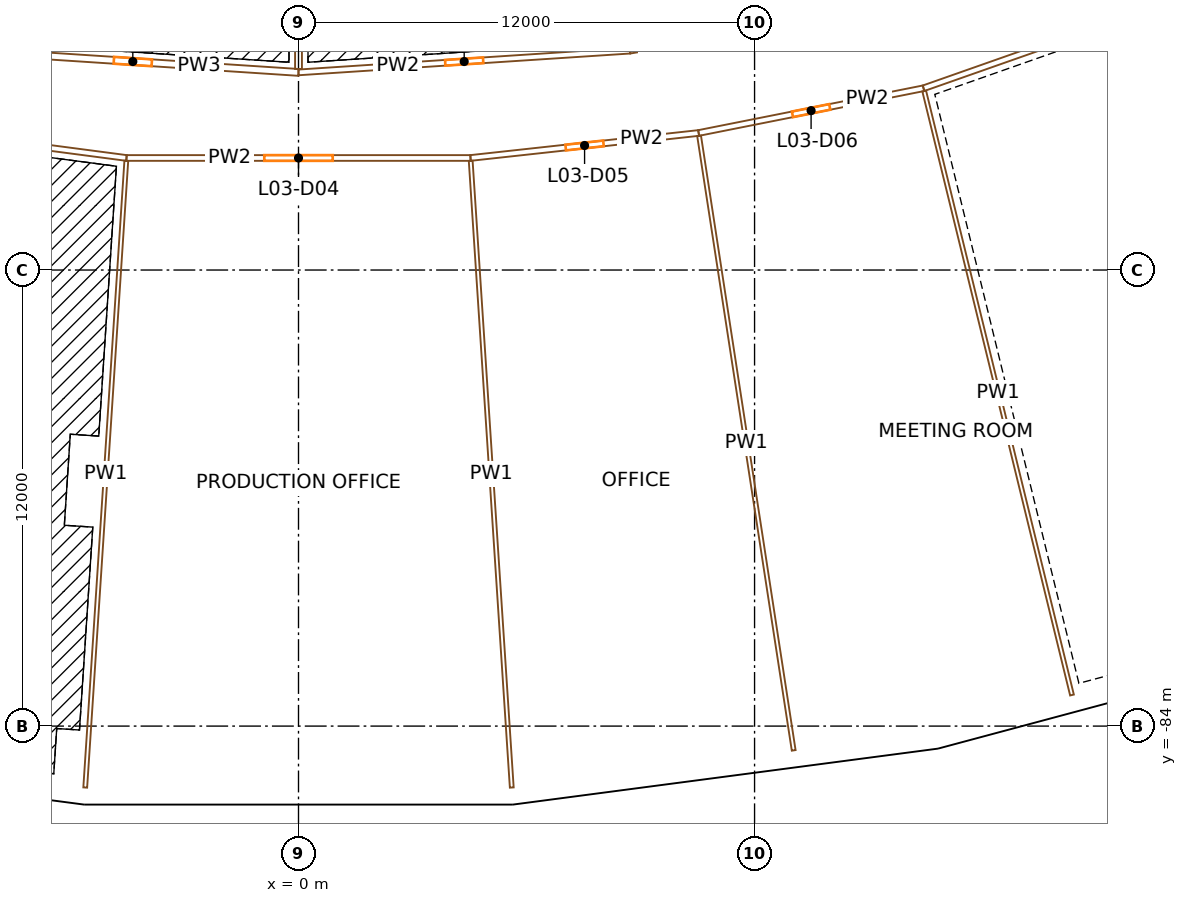
"""IFC4 building model, lengths in metres.
Left out: names, types, materials, properties, quantities, classifications, styles, units other than length and angle.
Written with IfcOpenShell. Run it as: python <this file> out.ifc"""

import sys

from ifc_helpers import new_model, si_unit, direction, frame, frame_2d, origin, origin_2d, place, context, subcontext, project, spatial, rectangle, extrude, element, fill, save


model = new_model("IFC4")
c1 = context("Model", 3, precision=1e-05, world=origin(), true_north=direction((0.0, 1.0)))
c2 = subcontext(c1, "Body", "Model", "MODEL_VIEW")
j1 = project(units=[si_unit("LENGTHUNIT", "METRE"), si_unit("PLANEANGLEUNIT", "RADIAN")], contexts=[c1])
p1 = place(None, origin())
s1 = spatial("IfcSite", under=j1, at=p1, CompositionType="ELEMENT")
p2 = place(p1, origin())
s2 = spatial("IfcBuilding", under=s1, at=p2, CompositionType="ELEMENT")
p3 = place(p2, frame((0.0, 0.0, 27.0)))
s3 = spatial("IfcBuildingStorey", under=s2, at=p3, CompositionType="ELEMENT", Elevation=27.0)
p4 = place(p3, frame((-5.085, -77.583, 0.0), z_axis=(0.0, 0.0, 1.0), x_axis=(0.997858923239, -0.06540312923, 0.0)))
e1 = element("IfcColumn", 1, at=p4, inside=s3, PredefinedType="COLUMN", context=c2, shape_type="SweptSolid", body=[
    extrude(rectangle(XDim=1.4, YDim=1.8, at=origin_2d()), origin(), (0.0, 0.0, 1.0), 4.5),
])
p5 = place(p3, frame((-5.576, -85.067, 0.0), z_axis=(0.0, 0.0, 1.0), x_axis=(0.997858923239, -0.06540312923, 0.0)))
e2 = element("IfcColumn", 2, at=p5, inside=s3, PredefinedType="COLUMN", context=c2, shape_type="SweptSolid", body=[
    extrude(rectangle(XDim=1.1, YDim=1.3, at=origin_2d()), origin(), (0.0, 0.0, 1.0), 4.5),
])
p6 = place(p3, frame((5.085, -77.583, 0.0), z_axis=(0.0, 0.0, 1.0), x_axis=(0.997858923239, 0.06540312923, 0.0)))
e3 = element("IfcColumn", 3, at=p6, inside=s3, PredefinedType="COLUMN", context=c2, shape_type="SweptSolid", body=[
    extrude(rectangle(XDim=1.4, YDim=1.8, at=origin_2d()), origin(), (0.0, 0.0, 1.0), 4.5),
])
p7 = place(p3, frame((5.576, -85.067, 0.0), z_axis=(0.0, 0.0, 1.0), x_axis=(0.997858923239, 0.06540312923, 0.0)))
e4 = element("IfcColumn", 4, at=p7, inside=s3, PredefinedType="COLUMN", context=c2, shape_type="SweptSolid", body=[
    extrude(rectangle(XDim=1.1, YDim=1.3, at=origin_2d()), origin(), (0.0, 0.0, 1.0), 4.5),
])
p8 = place(p3, frame((15.168, -76.256, 0.0), z_axis=(0.0, 0.0, 1.0), x_axis=(0.980785280403, 0.195090322016, 0.0)))
e5 = element("IfcColumn", 5, at=p8, inside=s3, PredefinedType="COLUMN", context=c2, shape_type="SweptSolid", body=[
    extrude(rectangle(XDim=1.4, YDim=1.8, at=origin_2d()), origin(), (0.0, 0.0, 1.0), 4.5),
])
p9 = place(p3, frame((16.631, -83.612, 0.0), z_axis=(0.0, 0.0, 1.0), x_axis=(0.980785280403, 0.195090322016, 0.0)))
e6 = element("IfcColumn", 6, at=p9, inside=s3, PredefinedType="COLUMN", context=c2, shape_type="SweptSolid", body=[
    extrude(rectangle(XDim=1.1, YDim=1.3, at=origin_2d()), origin(), (0.0, 0.0, 1.0), 4.5),
])
p10 = place(p3, frame((-5.656, -85.84, 0.0), z_axis=(0.0, 0.0, 1.0), x_axis=(1.0, 0.0, 0.0)))
e7 = element("IfcWall", 7, at=p10, inside=s3, PredefinedType="SOLIDWALL", context=c2, shape_type="SweptSolid", body=[
    extrude(rectangle(XDim=11.312, YDim=0.45, at=frame_2d((5.656, 0.0))), origin(), (0.0, 0.0, 1.0), 3.2),
])
p11 = place(p10, frame((4.006, 0.0, 0.9)))
e8 = element("IfcOpeningElement", 8, at=p11, cuts=e7, PredefinedType="OPENING", context=c2, shape_type="SweptSolid", body=[
    extrude(rectangle(XDim=1.2, YDim=2.15, at=frame_2d((0.6, 1.075))), frame((0.0, 0.235, 0.0), z_axis=(0.0, -1.0, 0.0), x_axis=(1.0, 0.0, 0.0)), (0.0, 0.0, 1.0), 0.47),
])
p12 = place(p10, frame((6.106, 0.0, 0.9)))
e9 = element("IfcOpeningElement", 9, at=p12, cuts=e7, PredefinedType="OPENING", context=c2, shape_type="SweptSolid", body=[
    extrude(rectangle(XDim=1.2, YDim=2.15, at=frame_2d((0.6, 1.075))), frame((0.0, 0.235, 0.0), z_axis=(0.0, -1.0, 0.0), x_axis=(1.0, 0.0, 0.0)), (0.0, 0.0, 1.0), 0.47),
])
p13 = place(p3, frame((5.685, -85.833, 0.0), z_axis=(0.0, 0.0, 1.0), x_axis=(0.991447502826, 0.130506126829, 0.0)))
e10 = element("IfcWall", 10, at=p13, inside=s3, PredefinedType="SOLIDWALL", context=c2, shape_type="SweptSolid", body=[
    extrude(rectangle(XDim=11.135, YDim=0.45, at=frame_2d((5.567, 0.0))), origin(), (0.0, 0.0, 1.0), 3.2),
])
p14 = place(p13, frame((3.917, 0.0, 0.9)))
e11 = element("IfcOpeningElement", 11, at=p14, cuts=e10, PredefinedType="OPENING", context=c2, shape_type="SweptSolid", body=[
    extrude(rectangle(XDim=1.2, YDim=2.15, at=frame_2d((0.6, 1.075))), frame((0.0, 0.235, 0.0), z_axis=(0.0, -1.0, 0.0), x_axis=(1.0, 0.0, 0.0)), (0.0, 0.0, 1.0), 0.47),
])
p15 = place(p13, frame((6.017, 0.0, 0.9)))
e12 = element("IfcOpeningElement", 12, at=p15, cuts=e10, PredefinedType="OPENING", context=c2, shape_type="SweptSolid", body=[
    extrude(rectangle(XDim=1.2, YDim=2.15, at=frame_2d((0.6, 1.075))), frame((0.0, 0.235, 0.0), z_axis=(0.0, -1.0, 0.0), x_axis=(1.0, 0.0, 0.0)), (0.0, 0.0, 1.0), 0.47),
])
p16 = place(p3, frame((16.754, -84.379, 0.0), z_axis=(0.0, 0.0, 1.0), x_axis=(0.965923678926, 0.258827059038, 0.0)))
e13 = element("IfcWall", 13, at=p16, inside=s3, PredefinedType="SOLIDWALL", context=c2, shape_type="SweptSolid", body=[
    extrude(rectangle(XDim=11.312, YDim=0.45, at=frame_2d((5.656, 0.0))), origin(), (0.0, 0.0, 1.0), 3.2),
])
p17 = place(p16, frame((4.006, 0.0, 0.9)))
e14 = element("IfcOpeningElement", 14, at=p17, cuts=e13, PredefinedType="OPENING", context=c2, shape_type="SweptSolid", body=[
    extrude(rectangle(XDim=1.2, YDim=2.15, at=frame_2d((0.6, 1.075))), frame((0.0, 0.235, 0.0), z_axis=(0.0, -1.0, 0.0), x_axis=(1.0, 0.0, 0.0)), (0.0, 0.0, 1.0), 0.47),
])
p18 = place(p16, frame((6.106, 0.0, 0.9)))
e15 = element("IfcOpeningElement", 15, at=p18, cuts=e13, PredefinedType="OPENING", context=c2, shape_type="SweptSolid", body=[
    extrude(rectangle(XDim=1.2, YDim=2.15, at=frame_2d((0.6, 1.075))), frame((0.0, 0.235, 0.0), z_axis=(0.0, -1.0, 0.0), x_axis=(1.0, 0.0, 0.0)), (0.0, 0.0, 1.0), 0.47),
])
p19 = place(p3, frame((-16.724, -84.379, 0.0), z_axis=(0.0, 0.0, 1.0), x_axis=(0.991447502826, -0.130506126829, 0.0)))
e16 = element("IfcWall", 16, at=p19, inside=s3, PredefinedType="SOLIDWALL", context=c2, shape_type="SweptSolid", body=[
    extrude(rectangle(XDim=11.135, YDim=0.45, at=frame_2d((5.567, 0.0))), origin(), (0.0, 0.0, 1.0), 3.2),
])
p20 = place(p19, frame((3.917, 0.0, 0.9)))
e17 = element("IfcOpeningElement", 17, at=p20, cuts=e16, PredefinedType="OPENING", context=c2, shape_type="SweptSolid", body=[
    extrude(rectangle(XDim=1.2, YDim=2.15, at=frame_2d((0.6, 1.075))), frame((0.0, 0.235, 0.0), z_axis=(0.0, -1.0, 0.0), x_axis=(1.0, 0.0, 0.0)), (0.0, 0.0, 1.0), 0.47),
])
p21 = place(p19, frame((6.017, 0.0, 0.9)))
e18 = element("IfcOpeningElement", 18, at=p21, cuts=e16, PredefinedType="OPENING", context=c2, shape_type="SweptSolid", body=[
    extrude(rectangle(XDim=1.2, YDim=2.15, at=frame_2d((0.6, 1.075))), frame((0.0, 0.235, 0.0), z_axis=(0.0, -1.0, 0.0), x_axis=(1.0, 0.0, 0.0)), (0.0, 0.0, 1.0), 0.47),
])
p22 = place(p3, frame((-4.526, -69.052, 0.0), z_axis=(0.0, 0.0, 1.0), x_axis=(-0.991446306881, 0.13051521203, 0.0)))
e19 = element("IfcWall", 19, at=p22, inside=s3, PredefinedType="PARTITIONING", context=c2, shape_type="SweptSolid", body=[
    extrude(rectangle(XDim=9.052, YDim=0.15, at=frame_2d((4.526, 0.0))), origin(), (0.0, 0.0, 1.0), 3.1),
])
p23 = place(p22, frame((3.626, 0.0, 0.0)))
e20 = element("IfcOpeningElement", 20, at=p23, cuts=e19, PredefinedType="OPENING", context=c2, shape_type="SweptSolid", body=[
    extrude(rectangle(XDim=1.8, YDim=2.1, at=frame_2d((0.9, 1.05))), frame((0.0, 0.085, 0.0), z_axis=(0.0, -1.0, 0.0), x_axis=(1.0, 0.0, 0.0)), (0.0, 0.0, 1.0), 0.17),
])
p24 = place(p3, frame((-8.719, -66.229, 0.0), z_axis=(0.0, 0.0, 1.0), x_axis=(0.997858593599, -0.065408158359, 0.0)))
e21 = element("IfcWall", 21, at=p24, inside=s3, PredefinedType="PARTITIONING", context=c2, shape_type="SweptSolid", body=[
    extrude(rectangle(XDim=8.738, YDim=0.18, at=frame_2d((4.369, 0.0))), origin(), (0.0, 0.0, 1.0), 3.1),
])
p25 = place(p24, frame((3.869, 0.0, 0.0)))
e22 = element("IfcOpeningElement", 22, at=p25, cuts=e21, PredefinedType="OPENING", context=c2, shape_type="SweptSolid", body=[
    extrude(rectangle(XDim=1.0, YDim=2.1, at=frame_2d((0.5, 1.05))), frame((0.0, 0.1, 0.0), z_axis=(0.0, -1.0, 0.0), x_axis=(1.0, 0.0, 0.0)), (0.0, 0.0, 1.0), 0.2),
])
p26 = place(p3, frame((-5.612, -85.616, 0.0), z_axis=(0.0, 0.0, 1.0), x_axis=(0.065405026615, 0.997858798876, 0.0)))
e23 = element("IfcWall", 23, at=p26, inside=s3, PredefinedType="PARTITIONING", context=c2, shape_type="SweptSolid", body=[
    extrude(rectangle(XDim=16.525, YDim=0.1, at=frame_2d((8.262, 0.0))), origin(), (0.0, 0.0, 1.0), 3.1),
])
p27 = place(p3, frame((4.526, -69.052, 0.0), z_axis=(0.0, 0.0, 1.0), x_axis=(-1.0, 0.0, 0.0)))
e24 = element("IfcWall", 24, at=p27, inside=s3, PredefinedType="PARTITIONING", context=c2, shape_type="SweptSolid", body=[
    extrude(rectangle(XDim=9.052, YDim=0.15, at=frame_2d((4.526, 0.0))), origin(), (0.0, 0.0, 1.0), 3.1),
])
p28 = place(p27, frame((3.626, 0.0, 0.0)))
e25 = element("IfcOpeningElement", 25, at=p28, cuts=e24, PredefinedType="OPENING", context=c2, shape_type="SweptSolid", body=[
    extrude(rectangle(XDim=1.8, YDim=2.1, at=frame_2d((0.9, 1.05))), frame((0.0, 0.085, 0.0), z_axis=(0.0, -1.0, 0.0), x_axis=(1.0, 0.0, 0.0)), (0.0, 0.0, 1.0), 0.17),
])
p29 = place(p3, frame((0.0, -66.8, 0.0), z_axis=(0.0, 0.0, 1.0), x_axis=(0.997858593599, 0.065408158359, 0.0)))
e26 = element("IfcWall", 26, at=p29, inside=s3, PredefinedType="PARTITIONING", context=c2, shape_type="SweptSolid", body=[
    extrude(rectangle(XDim=8.738, YDim=0.15, at=frame_2d((4.369, 0.0))), origin(), (0.0, 0.0, 1.0), 3.1),
])
p30 = place(p29, frame((3.869, 0.0, 0.0)))
e27 = element("IfcOpeningElement", 27, at=p30, cuts=e26, PredefinedType="OPENING", context=c2, shape_type="SweptSolid", body=[
    extrude(rectangle(XDim=1.0, YDim=2.1, at=frame_2d((0.5, 1.05))), frame((0.0, 0.085, 0.0), z_axis=(0.0, -1.0, 0.0), x_axis=(1.0, 0.0, 0.0)), (0.0, 0.0, 1.0), 0.17),
])
p31 = place(p3, frame((0.0, -50.094, 0.0), z_axis=(0.0, 0.0, 1.0), x_axis=(0.0, -1.0, 0.0)))
e28 = element("IfcWall", 28, at=p31, inside=s3, PredefinedType="PARTITIONING", context=c2, shape_type="SweptSolid", body=[
    extrude(rectangle(XDim=16.616, YDim=0.18, at=frame_2d((8.308, 0.0))), origin(), (0.0, 0.0, 1.0), 3.1),
])
p32 = place(p3, frame((10.529, -68.394, 0.0), z_axis=(0.0, 0.0, 1.0), x_axis=(-0.994055567966, -0.108873907782, 0.0)))
e29 = element("IfcWall", 29, at=p32, inside=s3, PredefinedType="PARTITIONING", context=c2, shape_type="SweptSolid", body=[
    extrude(rectangle(XDim=6.039, YDim=0.15, at=frame_2d((3.02, 0.0))), origin(), (0.0, 0.0, 1.0), 3.1),
])
p33 = place(p32, frame((2.52, 0.0, 0.0)))
e30 = element("IfcOpeningElement", 30, at=p33, cuts=e29, PredefinedType="OPENING", context=c2, shape_type="SweptSolid", body=[
    extrude(rectangle(XDim=1.0, YDim=2.1, at=frame_2d((0.5, 1.05))), frame((0.0, 0.085, 0.0), z_axis=(0.0, -1.0, 0.0), x_axis=(1.0, 0.0, 0.0)), (0.0, 0.0, 1.0), 0.17),
])
p34 = place(p3, frame((5.612, -85.616, 0.0), z_axis=(0.0, 0.0, 1.0), x_axis=(-0.065405026615, 0.997858798876, 0.0)))
e31 = element("IfcWall", 31, at=p34, inside=s3, PredefinedType="PARTITIONING", context=c2, shape_type="SweptSolid", body=[
    extrude(rectangle(XDim=16.525, YDim=0.1, at=frame_2d((8.262, 0.0))), origin(), (0.0, 0.0, 1.0), 3.1),
])
p35 = place(p3, frame((8.719, -66.229, 0.0), z_axis=(0.0, 0.0, 1.0), x_axis=(0.986638873051, 0.162922479065, 0.0)))
e32 = element("IfcWall", 32, at=p35, inside=s3, PredefinedType="PARTITIONING", context=c2, shape_type="SweptSolid", body=[
    extrude(rectangle(XDim=4.371, YDim=0.15, at=frame_2d((2.186, 0.0))), origin(), (0.0, 0.0, 1.0), 3.1),
])
p36 = place(p35, frame((1.686, 0.0, 0.0)))
e33 = element("IfcOpeningElement", 33, at=p36, cuts=e32, PredefinedType="OPENING", context=c2, shape_type="SweptSolid", body=[
    extrude(rectangle(XDim=1.0, YDim=2.1, at=frame_2d((0.5, 1.05))), frame((0.0, 0.085, 0.0), z_axis=(0.0, -1.0, 0.0), x_axis=(1.0, 0.0, 0.0)), (0.0, 0.0, 1.0), 0.17),
])
p37 = place(p3, frame((16.446, -67.217, 0.0), z_axis=(0.0, 0.0, 1.0), x_axis=(-0.980785582749, -0.195088802015, 0.0)))
e34 = element("IfcWall", 34, at=p37, inside=s3, PredefinedType="PARTITIONING", context=c2, shape_type="SweptSolid", body=[
    extrude(rectangle(XDim=6.033, YDim=0.15, at=frame_2d((3.017, 0.0))), origin(), (0.0, 0.0, 1.0), 3.1),
])
p38 = place(p37, frame((2.517, 0.0, 0.0)))
e35 = element("IfcOpeningElement", 35, at=p38, cuts=e34, PredefinedType="OPENING", context=c2, shape_type="SweptSolid", body=[
    extrude(rectangle(XDim=1.0, YDim=2.1, at=frame_2d((0.5, 1.05))), frame((0.0, 0.085, 0.0), z_axis=(0.0, -1.0, 0.0), x_axis=(1.0, 0.0, 0.0)), (0.0, 0.0, 1.0), 0.17),
])
p39 = place(p3, frame((13.03, -84.639, 0.0), z_axis=(0.0, 0.0, 1.0), x_axis=(-0.15214688942, 0.988357892689, 0.0)))
e36 = element("IfcWall", 36, at=p39, inside=s3, PredefinedType="PARTITIONING", context=c2, shape_type="SweptSolid", body=[
    extrude(rectangle(XDim=16.361, YDim=0.1, at=frame_2d((8.18, 0.0))), origin(), (0.0, 0.0, 1.0), 3.1),
])
p40 = place(p3, frame((29.175, -62.741, 0.0), z_axis=(0.0, 0.0, 1.0), x_axis=(-0.94336986797, -0.33174281033, 0.0)))
e37 = element("IfcWall", 37, at=p40, inside=s3, PredefinedType="PARTITIONING", context=c2, shape_type="SweptSolid", body=[
    extrude(rectangle(XDim=13.493, YDim=0.15, at=frame_2d((6.746, 0.0))), origin(), (0.0, 0.0, 1.0), 3.1),
])
p41 = place(p40, frame((5.846, 0.0, 0.0)))
e38 = element("IfcOpeningElement", 38, at=p41, cuts=e37, PredefinedType="OPENING", context=c2, shape_type="SweptSolid", body=[
    extrude(rectangle(XDim=1.8, YDim=2.1, at=frame_2d((0.9, 1.05))), frame((0.0, 0.085, 0.0), z_axis=(0.0, -1.0, 0.0), x_axis=(1.0, 0.0, 0.0)), (0.0, 0.0, 1.0), 0.17),
])
p42 = place(p3, frame((20.352, -83.182, 0.0), z_axis=(0.0, 0.0, 1.0), x_axis=(-0.23765209547, 0.971350339228, 0.0)))
e39 = element("IfcWall", 39, at=p42, inside=s3, PredefinedType="PARTITIONING", context=c2, shape_type="SweptSolid", body=[
    extrude(rectangle(XDim=16.361, YDim=0.1, at=frame_2d((8.18, 0.0))), origin(), (0.0, 0.0, 1.0), 3.1),
])
p43 = place(p11, origin())
e40 = element("IfcWindow", 40, at=p43, inside=s3, PartitioningType="SINGLE_PANEL", PredefinedType="WINDOW", context=c2, shape_type="SweptSolid", body=[
    extrude(rectangle(XDim=1.2, YDim=2.15, at=frame_2d((0.6, 1.075))), frame((0.0, 0.03, 0.0), z_axis=(0.0, -1.0, 0.0), x_axis=(1.0, 0.0, 0.0)), (0.0, 0.0, 1.0), 0.06),
])
fill(e8, e40)
p44 = place(p12, origin())
e41 = element("IfcWindow", 41, at=p44, inside=s3, PartitioningType="SINGLE_PANEL", PredefinedType="WINDOW", context=c2, shape_type="SweptSolid", body=[
    extrude(rectangle(XDim=1.2, YDim=2.15, at=frame_2d((0.6, 1.075))), frame((0.0, 0.03, 0.0), z_axis=(0.0, -1.0, 0.0), x_axis=(1.0, 0.0, 0.0)), (0.0, 0.0, 1.0), 0.06),
])
fill(e9, e41)
p45 = place(p14, origin())
e42 = element("IfcWindow", 42, at=p45, inside=s3, PartitioningType="SINGLE_PANEL", PredefinedType="WINDOW", context=c2, shape_type="SweptSolid", body=[
    extrude(rectangle(XDim=1.2, YDim=2.15, at=frame_2d((0.6, 1.075))), frame((0.0, 0.03, 0.0), z_axis=(0.0, -1.0, 0.0), x_axis=(1.0, 0.0, 0.0)), (0.0, 0.0, 1.0), 0.06),
])
fill(e11, e42)
p46 = place(p15, origin())
e43 = element("IfcWindow", 43, at=p46, inside=s3, PartitioningType="SINGLE_PANEL", PredefinedType="WINDOW", context=c2, shape_type="SweptSolid", body=[
    extrude(rectangle(XDim=1.2, YDim=2.15, at=frame_2d((0.6, 1.075))), frame((0.0, 0.03, 0.0), z_axis=(0.0, -1.0, 0.0), x_axis=(1.0, 0.0, 0.0)), (0.0, 0.0, 1.0), 0.06),
])
fill(e12, e43)
p47 = place(p17, origin())
e44 = element("IfcWindow", 44, at=p47, inside=s3, PartitioningType="SINGLE_PANEL", PredefinedType="WINDOW", context=c2, shape_type="SweptSolid", body=[
    extrude(rectangle(XDim=1.2, YDim=2.15, at=frame_2d((0.6, 1.075))), frame((0.0, 0.03, 0.0), z_axis=(0.0, -1.0, 0.0), x_axis=(1.0, 0.0, 0.0)), (0.0, 0.0, 1.0), 0.06),
])
fill(e14, e44)
p48 = place(p28, origin())
e45 = element("IfcDoor", 45, at=p48, inside=s3, OperationType="DOUBLE_DOOR_SINGLE_SWING", PredefinedType="DOOR", context=c2, shape_type="SweptSolid", body=[
    extrude(rectangle(XDim=1.8, YDim=2.1, at=frame_2d((0.9, 1.05))), frame((0.0, 0.025, 0.0), z_axis=(0.0, -1.0, 0.0), x_axis=(1.0, 0.0, 0.0)), (0.0, 0.0, 1.0), 0.05),
])
fill(e25, e45)
p49 = place(p33, origin())
e46 = element("IfcDoor", 46, at=p49, inside=s3, OperationType="SINGLE_SWING_RIGHT", PredefinedType="DOOR", context=c2, shape_type="SweptSolid", body=[
    extrude(rectangle(XDim=1.0, YDim=2.1, at=frame_2d((0.5, 1.05))), frame((0.0, 0.025, 0.0), z_axis=(0.0, -1.0, 0.0), x_axis=(1.0, 0.0, 0.0)), (0.0, 0.0, 1.0), 0.05),
])
fill(e30, e46)
p50 = place(p38, origin())
e47 = element("IfcDoor", 47, at=p50, inside=s3, OperationType="SINGLE_SWING_RIGHT", PredefinedType="DOOR", context=c2, shape_type="SweptSolid", body=[
    extrude(rectangle(XDim=1.0, YDim=2.1, at=frame_2d((0.5, 1.05))), frame((0.0, 0.025, 0.0), z_axis=(0.0, -1.0, 0.0), x_axis=(1.0, 0.0, 0.0)), (0.0, 0.0, 1.0), 0.05),
])
fill(e35, e47)
p51 = place(p25, origin())
e48 = element("IfcDoor", 48, at=p51, inside=s3, OperationType="SINGLE_SWING_RIGHT", PredefinedType="DOOR", context=c2, shape_type="SweptSolid", body=[
    extrude(rectangle(XDim=1.0, YDim=2.1, at=frame_2d((0.5, 1.05))), frame((0.0, 0.025, 0.0), z_axis=(0.0, -1.0, 0.0), x_axis=(1.0, 0.0, 0.0)), (0.0, 0.0, 1.0), 0.05),
])
fill(e22, e48)
p52 = place(p30, origin())
e49 = element("IfcDoor", 49, at=p52, inside=s3, OperationType="SINGLE_SWING_RIGHT", PredefinedType="DOOR", context=c2, shape_type="SweptSolid", body=[
    extrude(rectangle(XDim=1.0, YDim=2.1, at=frame_2d((0.5, 1.05))), frame((0.0, 0.025, 0.0), z_axis=(0.0, -1.0, 0.0), x_axis=(1.0, 0.0, 0.0)), (0.0, 0.0, 1.0), 0.05),
])
fill(e27, e49)
save(model, sys.argv[1])
